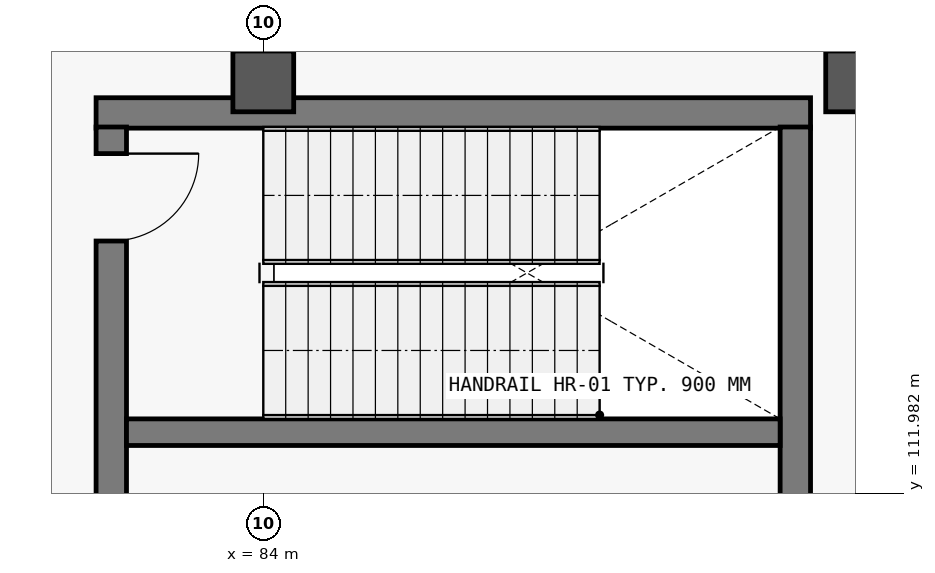
"""IFC4 building model, lengths in metres.
Left out: names, types, materials, properties, quantities, classifications, styles, units other than length and angle.
Written with IfcOpenShell. Run it as: python <this file> out.ifc"""

import sys

from ifc_helpers import new_model, si_unit, direction, frame, frame_2d, origin, origin_2d, place, context, subcontext, project, spatial, rectangle, extrude, element, fill, save


model = new_model("IFC4")
c1 = context("Model", 3, precision=1e-05, world=origin(), true_north=direction((0.0, 1.0)))
c2 = subcontext(c1, "Body", "Model", "MODEL_VIEW")
j1 = project(units=[si_unit("LENGTHUNIT", "METRE"), si_unit("PLANEANGLEUNIT", "RADIAN")], contexts=[c1])
p1 = place(None, origin())
s1 = spatial("IfcSite", under=j1, at=p1, CompositionType="ELEMENT")
p2 = place(p1, origin())
s2 = spatial("IfcBuilding", under=s1, at=p2, CompositionType="ELEMENT")
p3 = place(p2, frame((0.0, 0.0, 5.4)))
s3 = spatial("IfcBuildingStorey", under=s2, at=p3, CompositionType="ELEMENT", Elevation=5.4)
for number, where, z_axis, x_axis in (
    (1, (84.0, 117.4, 0.0), (0.0, 0.0, 1.0), (1.0, 0.0, 0.0)),
    (2, (91.8, 117.4, 0.0), (0.0, 0.0, 1.0), (1.0, 0.0, 0.0)),
):
    element("IfcColumn", number, at=place(p3, frame(where, z_axis=z_axis, x_axis=x_axis)), inside=s3, PredefinedType="COLUMN", context=c2, shape_type="SweptSolid", body=[
        extrude(rectangle(XDim=0.8, YDim=0.8, at=origin_2d()), origin(), (0.0, 0.0, 1.0), 5.4),
    ])
p4 = place(p3, frame((91.2, 116.985, 0.0), z_axis=(0.0, 0.0, 1.0), x_axis=(-1.0, 0.0, 0.0)))
e3 = element("IfcWall", 3, at=p4, inside=s3, PredefinedType="SHEAR", context=c2, shape_type="SweptSolid", body=[
    extrude(rectangle(XDim=9.4, YDim=0.4, at=frame_2d((4.7, 0.0))), origin(), (0.0, 0.0, 1.0), 5.08),
])
p5 = place(p3, frame((82.0, 116.8, 0.0), z_axis=(0.0, 0.0, 1.0), x_axis=(0.0, -1.0, 0.0)))
e4 = element("IfcWall", 4, at=p5, inside=s3, PredefinedType="SHEAR", context=c2, shape_type="SweptSolid", body=[
    extrude(rectangle(XDim=7.2, YDim=0.4, at=frame_2d((3.6, 0.0))), origin(), (0.0, 0.0, 1.0), 5.08),
])
p6 = place(p5, frame((0.35, 0.0, 0.0)))
e5 = element("IfcOpeningElement", 5, at=p6, cuts=e4, PredefinedType="OPENING", context=c2, shape_type="SweptSolid", body=[
    extrude(rectangle(XDim=1.15, YDim=2.2, at=frame_2d((0.575, 1.1))), frame((0.0, 0.21, 0.0), z_axis=(0.0, -1.0, 0.0), x_axis=(1.0, 0.0, 0.0)), (0.0, 0.0, 1.0), 0.42),
])
p7 = place(p3, frame((91.0, 109.6, 0.0), z_axis=(0.0, 0.0, 1.0), x_axis=(0.0, 1.0, 0.0)))
e6 = element("IfcWall", 6, at=p7, inside=s3, PredefinedType="SHEAR", context=c2, shape_type="SweptSolid", body=[
    extrude(rectangle(XDim=7.2, YDim=0.4, at=frame_2d((3.6, 0.0))), origin(), (0.0, 0.0, 1.0), 5.08),
])
p8 = place(p3, frame((82.2, 112.785, 0.0), z_axis=(0.0, 0.0, 1.0), x_axis=(1.0, 0.0, 0.0)))
e7 = element("IfcWall", 7, at=p8, inside=s3, PredefinedType="SHEAR", context=c2, shape_type="SweptSolid", body=[
    extrude(rectangle(XDim=8.6, YDim=0.35, at=frame_2d((4.3, 0.0))), origin(), (0.0, 0.0, 1.0), 5.08),
])
p9 = place(p6, origin())
e8 = element("IfcDoor", 8, at=p9, inside=s3, OperationType="SINGLE_SWING_LEFT", PredefinedType="DOOR", context=c2, shape_type="SweptSolid", body=[
    extrude(rectangle(XDim=1.15, YDim=2.2, at=frame_2d((0.575, 1.1))), frame((0.0, 0.025, 0.0), z_axis=(0.0, -1.0, 0.0), x_axis=(1.0, 0.0, 0.0)), (0.0, 0.0, 1.0), 0.05),
])
fill(e5, e8)
save(model, sys.argv[1])
